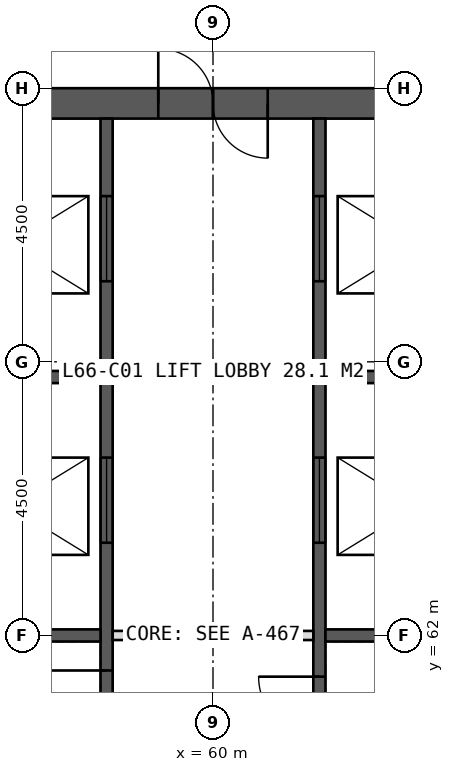
"""IFC4 building model, lengths in metres.
Left out: names, types, materials, properties, quantities, classifications, styles, units other than length and angle.
Written with IfcOpenShell. Run it as: python <this file> out.ifc"""

import sys

from ifc_helpers import new_model, si_unit, direction, frame, frame_2d, origin, place, context, subcontext, project, spatial, rectangle, extrude, element, fill, save


model = new_model("IFC4")
c1 = context("Model", 3, precision=1e-05, world=origin(), true_north=direction((0.0, 1.0)))
c2 = subcontext(c1, "Body", "Model", "MODEL_VIEW")
j1 = project(units=[si_unit("LENGTHUNIT", "METRE"), si_unit("PLANEANGLEUNIT", "RADIAN")], contexts=[c1])
p1 = place(None, origin())
s1 = spatial("IfcSite", under=j1, at=p1, CompositionType="ELEMENT")
p2 = place(p1, origin())
s2 = spatial("IfcBuilding", under=s1, at=p2, CompositionType="ELEMENT")
p3 = place(p2, frame((0.0, 0.0, 274.0)))
s3 = spatial("IfcBuildingStorey", under=s2, at=p3, CompositionType="ELEMENT", Elevation=274.0)
p4 = place(p3, frame((51.0, 70.75, 0.0), z_axis=(0.0, 0.0, 1.0), x_axis=(1.0, 0.0, 0.0)))
e1 = element("IfcWall", 1, at=p4, inside=s3, PredefinedType="SHEAR", context=c2, shape_type="SweptSolid", body=[
    extrude(rectangle(XDim=18.0, YDim=0.5, at=frame_2d((9.0, 0.0))), origin(), (0.0, 0.0, 1.0), 4.0),
])
p5 = place(p4, frame((8.1, 0.0, 0.0)))
e2 = element("IfcOpeningElement", 2, at=p5, cuts=e1, PredefinedType="OPENING", context=c2, shape_type="SweptSolid", body=[
    extrude(rectangle(XDim=1.8, YDim=2.2, at=frame_2d((0.9, 1.1))), frame((0.0, 0.26, 0.0), z_axis=(0.0, -1.0, 0.0), x_axis=(1.0, 0.0, 0.0)), (0.0, 0.0, 1.0), 0.52),
])
p6 = place(p3, frame((58.25, 53.5, 0.0), z_axis=(0.0, 0.0, 1.0), x_axis=(0.0, 1.0, 0.0)))
e3 = element("IfcWall", 3, at=p6, inside=s3, PredefinedType="SHEAR", context=c2, shape_type="SweptSolid", body=[
    extrude(rectangle(XDim=17.0, YDim=0.2, at=frame_2d((8.5, 0.0))), origin(), (0.0, 0.0, 1.0), 4.0),
])
p7 = place(p6, frame((0.6, 0.0, 0.0)))
e4 = element("IfcOpeningElement", 4, at=p7, cuts=e3, PredefinedType="OPENING", context=c2, shape_type="SweptSolid", body=[
    extrude(rectangle(XDim=1.0, YDim=2.1, at=frame_2d((0.5, 1.05))), frame((0.0, 0.11, 0.0), z_axis=(0.0, -1.0, 0.0), x_axis=(1.0, 0.0, 0.0)), (0.0, 0.0, 1.0), 0.22),
])
p8 = place(p6, frame((2.75, 0.0, 0.0)))
e5 = element("IfcOpeningElement", 5, at=p8, cuts=e3, PredefinedType="OPENING", context=c2, shape_type="SweptSolid", body=[
    extrude(rectangle(XDim=1.0, YDim=2.1, at=frame_2d((0.5, 1.05))), frame((0.0, 0.11, 0.0), z_axis=(0.0, -1.0, 0.0), x_axis=(1.0, 0.0, 0.0)), (0.0, 0.0, 1.0), 0.22),
])
p9 = place(p6, frame((4.824, 0.0, 0.0)))
e6 = element("IfcOpeningElement", 6, at=p9, cuts=e3, PredefinedType="OPENING", context=c2, shape_type="SweptSolid", body=[
    extrude(rectangle(XDim=1.0, YDim=2.1, at=frame_2d((0.5, 1.05))), frame((0.0, 0.11, 0.0), z_axis=(0.0, -1.0, 0.0), x_axis=(1.0, 0.0, 0.0)), (0.0, 0.0, 1.0), 0.22),
])
p10 = place(p6, frame((6.924, 0.0, 0.0)))
e7 = element("IfcOpeningElement", 7, at=p10, cuts=e3, PredefinedType="OPENING", context=c2, shape_type="SweptSolid", body=[
    extrude(rectangle(XDim=1.0, YDim=2.1, at=frame_2d((0.5, 1.05))), frame((0.0, 0.11, 0.0), z_axis=(0.0, -1.0, 0.0), x_axis=(1.0, 0.0, 0.0)), (0.0, 0.0, 1.0), 0.22),
])
p11 = place(p6, frame((10.025, 0.0, 0.0)))
e8 = element("IfcOpeningElement", 8, at=p11, cuts=e3, PredefinedType="OPENING", context=c2, shape_type="SweptSolid", body=[
    extrude(rectangle(XDim=1.4, YDim=2.2, at=frame_2d((0.7, 1.1))), frame((0.0, 0.11, 0.0), z_axis=(0.0, -1.0, 0.0), x_axis=(1.0, 0.0, 0.0)), (0.0, 0.0, 1.0), 0.22),
])
p12 = place(p6, frame((14.325, 0.0, 0.0)))
e9 = element("IfcOpeningElement", 9, at=p12, cuts=e3, PredefinedType="OPENING", context=c2, shape_type="SweptSolid", body=[
    extrude(rectangle(XDim=1.4, YDim=2.2, at=frame_2d((0.7, 1.1))), frame((0.0, 0.11, 0.0), z_axis=(0.0, -1.0, 0.0), x_axis=(1.0, 0.0, 0.0)), (0.0, 0.0, 1.0), 0.22),
])
p13 = place(p3, frame((61.75, 53.5, 0.0), z_axis=(0.0, 0.0, 1.0), x_axis=(0.0, 1.0, 0.0)))
e10 = element("IfcWall", 10, at=p13, inside=s3, PredefinedType="SHEAR", context=c2, shape_type="SweptSolid", body=[
    extrude(rectangle(XDim=17.0, YDim=0.2, at=frame_2d((8.5, 0.0))), origin(), (0.0, 0.0, 1.0), 4.0),
])
p14 = place(p13, frame((0.808, 0.0, 0.0)))
e11 = element("IfcOpeningElement", 11, at=p14, cuts=e10, PredefinedType="OPENING", context=c2, shape_type="SweptSolid", body=[
    extrude(rectangle(XDim=1.0, YDim=2.1, at=frame_2d((0.5, 1.05))), frame((0.0, 0.11, 0.0), z_axis=(0.0, -1.0, 0.0), x_axis=(1.0, 0.0, 0.0)), (0.0, 0.0, 1.0), 0.22),
])
p15 = place(p13, frame((2.958, 0.0, 0.0)))
e12 = element("IfcOpeningElement", 12, at=p15, cuts=e10, PredefinedType="OPENING", context=c2, shape_type="SweptSolid", body=[
    extrude(rectangle(XDim=1.0, YDim=2.1, at=frame_2d((0.5, 1.05))), frame((0.0, 0.11, 0.0), z_axis=(0.0, -1.0, 0.0), x_axis=(1.0, 0.0, 0.0)), (0.0, 0.0, 1.0), 0.22),
])
p16 = place(p13, frame((4.722, 0.0, 0.0)))
e13 = element("IfcOpeningElement", 13, at=p16, cuts=e10, PredefinedType="OPENING", context=c2, shape_type="SweptSolid", body=[
    extrude(rectangle(XDim=1.0, YDim=2.1, at=frame_2d((0.5, 1.05))), frame((0.0, 0.11, 0.0), z_axis=(0.0, -1.0, 0.0), x_axis=(1.0, 0.0, 0.0)), (0.0, 0.0, 1.0), 0.22),
])
p17 = place(p13, frame((6.823, 0.0, 0.0)))
e14 = element("IfcOpeningElement", 14, at=p17, cuts=e10, PredefinedType="OPENING", context=c2, shape_type="SweptSolid", body=[
    extrude(rectangle(XDim=1.0, YDim=2.1, at=frame_2d((0.5, 1.05))), frame((0.0, 0.11, 0.0), z_axis=(0.0, -1.0, 0.0), x_axis=(1.0, 0.0, 0.0)), (0.0, 0.0, 1.0), 0.22),
])
p18 = place(p13, frame((10.025, 0.0, 0.0)))
e15 = element("IfcOpeningElement", 15, at=p18, cuts=e10, PredefinedType="OPENING", context=c2, shape_type="SweptSolid", body=[
    extrude(rectangle(XDim=1.4, YDim=2.2, at=frame_2d((0.7, 1.1))), frame((0.0, 0.11, 0.0), z_axis=(0.0, -1.0, 0.0), x_axis=(1.0, 0.0, 0.0)), (0.0, 0.0, 1.0), 0.22),
])
p19 = place(p13, frame((14.325, 0.0, 0.0)))
e16 = element("IfcOpeningElement", 16, at=p19, cuts=e10, PredefinedType="OPENING", context=c2, shape_type="SweptSolid", body=[
    extrude(rectangle(XDim=1.4, YDim=2.2, at=frame_2d((0.7, 1.1))), frame((0.0, 0.11, 0.0), z_axis=(0.0, -1.0, 0.0), x_axis=(1.0, 0.0, 0.0)), (0.0, 0.0, 1.0), 0.22),
])
for number, where, z_axis, x_axis in (
    (17, (55.1, 62.0, 0.0), (0.0, 0.0, 1.0), (1.0, 0.0, 0.0)),
    (18, (61.85, 62.0, 0.0), (0.0, 0.0, 1.0), (1.0, 0.0, 0.0)),
    (19, (55.1, 66.25, 0.0), (0.0, 0.0, 1.0), (1.0, 0.0, 0.0)),
    (20, (61.85, 66.25, 0.0), (0.0, 0.0, 1.0), (1.0, 0.0, 0.0)),
):
    element("IfcWall", number, at=place(p3, frame(where, z_axis=z_axis, x_axis=x_axis)), inside=s3, PredefinedType="SHEAR", context=c2, shape_type="SweptSolid", body=[
        extrude(rectangle(XDim=3.05, YDim=0.2, at=frame_2d((1.525, 0.0))), origin(), (0.0, 0.0, 1.0), 4.0),
    ])
p20 = place(p3, frame((58.35, 62.0, 0.0), z_axis=(0.0, 0.0, 1.0), x_axis=(1.0, 0.0, 0.0)))
e21 = element("IfcWall", 21, at=p20, inside=s3, PredefinedType="PARTITIONING", context=c2, shape_type="SweptSolid", body=[
    extrude(rectangle(XDim=3.3, YDim=0.15, at=frame_2d((1.65, 0.0))), origin(), (0.0, 0.0, 1.0), 3.75),
])
p21 = place(p5, origin())
e22 = element("IfcDoor", 22, at=p21, inside=s3, OperationType="DOUBLE_DOOR_SINGLE_SWING", PredefinedType="DOOR", context=c2, shape_type="SweptSolid", body=[
    extrude(rectangle(XDim=1.8, YDim=2.2, at=frame_2d((0.9, 1.1))), frame((0.0, 0.025, 0.0), z_axis=(0.0, -1.0, 0.0), x_axis=(1.0, 0.0, 0.0)), (0.0, 0.0, 1.0), 0.05),
])
fill(e2, e22)
p22 = place(p10, origin())
e23 = element("IfcDoor", 23, at=p22, inside=s3, OperationType="SINGLE_SWING_RIGHT", PredefinedType="DOOR", context=c2, shape_type="SweptSolid", body=[
    extrude(rectangle(XDim=1.0, YDim=2.1, at=frame_2d((0.5, 1.05))), frame((0.0, 0.025, 0.0), z_axis=(0.0, -1.0, 0.0), x_axis=(1.0, 0.0, 0.0)), (0.0, 0.0, 1.0), 0.05),
])
fill(e7, e23)
p23 = place(p17, origin())
e24 = element("IfcDoor", 24, at=p23, inside=s3, OperationType="SINGLE_SWING_RIGHT", PredefinedType="DOOR", context=c2, shape_type="SweptSolid", body=[
    extrude(rectangle(XDim=1.0, YDim=2.1, at=frame_2d((0.5, 1.05))), frame((0.0, 0.025, 0.0), z_axis=(0.0, -1.0, 0.0), x_axis=(1.0, 0.0, 0.0)), (0.0, 0.0, 1.0), 0.05),
])
fill(e14, e24)
p24 = place(p11, origin())
e25 = element("IfcDoor", 25, at=p24, inside=s3, OperationType="SLIDING_TO_LEFT", PredefinedType="DOOR", context=c2, shape_type="SweptSolid", body=[
    extrude(rectangle(XDim=1.4, YDim=2.2, at=frame_2d((0.7, 1.1))), frame((0.0, 0.025, 0.0), z_axis=(0.0, -1.0, 0.0), x_axis=(1.0, 0.0, 0.0)), (0.0, 0.0, 1.0), 0.05),
])
fill(e8, e25)
p25 = place(p18, origin())
e26 = element("IfcDoor", 26, at=p25, inside=s3, OperationType="SLIDING_TO_LEFT", PredefinedType="DOOR", context=c2, shape_type="SweptSolid", body=[
    extrude(rectangle(XDim=1.4, YDim=2.2, at=frame_2d((0.7, 1.1))), frame((0.0, 0.025, 0.0), z_axis=(0.0, -1.0, 0.0), x_axis=(1.0, 0.0, 0.0)), (0.0, 0.0, 1.0), 0.05),
])
fill(e15, e26)
p26 = place(p12, origin())
e27 = element("IfcDoor", 27, at=p26, inside=s3, OperationType="SLIDING_TO_LEFT", PredefinedType="DOOR", context=c2, shape_type="SweptSolid", body=[
    extrude(rectangle(XDim=1.4, YDim=2.2, at=frame_2d((0.7, 1.1))), frame((0.0, 0.025, 0.0), z_axis=(0.0, -1.0, 0.0), x_axis=(1.0, 0.0, 0.0)), (0.0, 0.0, 1.0), 0.05),
])
fill(e9, e27)
p27 = place(p19, origin())
e28 = element("IfcDoor", 28, at=p27, inside=s3, OperationType="SLIDING_TO_LEFT", PredefinedType="DOOR", context=c2, shape_type="SweptSolid", body=[
    extrude(rectangle(XDim=1.4, YDim=2.2, at=frame_2d((0.7, 1.1))), frame((0.0, 0.025, 0.0), z_axis=(0.0, -1.0, 0.0), x_axis=(1.0, 0.0, 0.0)), (0.0, 0.0, 1.0), 0.05),
])
fill(e16, e28)
save(model, sys.argv[1])
